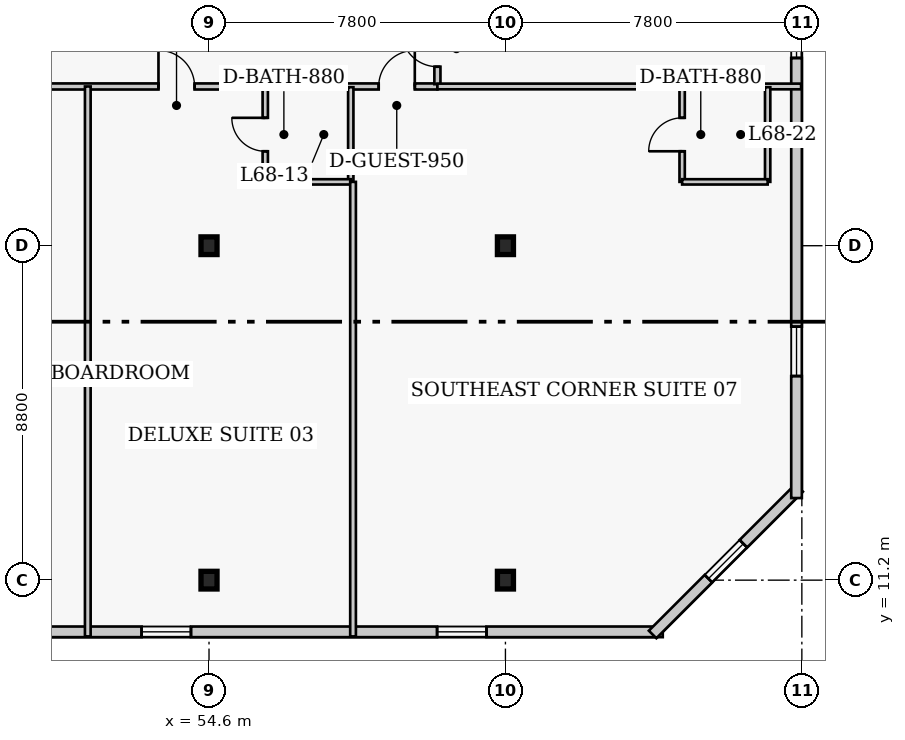
"""IFC4 building model, lengths in metres.
Left out: names, types, materials, properties, quantities, classifications, styles, units other than length and angle.
Written with IfcOpenShell. Run it as: python <this file> out.ifc"""

import sys

from ifc_helpers import new_model, si_unit, direction, frame, frame_2d, origin, origin_2d, place, context, subcontext, project, spatial, rectangle, i_section, extrude, element, fill, save


model = new_model("IFC4")
c1 = context("Model", 3, precision=1e-05, world=origin(), true_north=direction((0.0, 1.0)))
c2 = subcontext(c1, "Body", "Model", "MODEL_VIEW")
j1 = project(units=[si_unit("LENGTHUNIT", "METRE"), si_unit("PLANEANGLEUNIT", "RADIAN")], contexts=[c1])
p1 = place(None, origin())
s1 = spatial("IfcSite", under=j1, at=p1, CompositionType="ELEMENT")
p2 = place(p1, origin())
s2 = spatial("IfcBuilding", under=s1, at=p2, CompositionType="ELEMENT")
p3 = place(p2, frame((0.0, 0.0, 273.4)))
s3 = spatial("IfcBuildingStorey", under=s2, at=p3, CompositionType="ELEMENT", Elevation=273.4)
for number, where, z_axis, x_axis in (
    (1, (54.6, 11.2, 0.0), (0.0, 0.0, 1.0), (1.0, 0.0, 0.0)),
    (2, (54.6, 20.0, 0.0), (0.0, 0.0, 1.0), (1.0, 0.0, 0.0)),
    (3, (62.4, 11.2, 0.0), (0.0, 0.0, 1.0), (1.0, 0.0, 0.0)),
    (4, (62.4, 20.0, 0.0), (0.0, 0.0, 1.0), (1.0, 0.0, 0.0)),
):
    element("IfcColumn", number, at=place(p3, frame(where, z_axis=z_axis, x_axis=x_axis)), inside=s3, PredefinedType="COLUMN", context=c2, shape_type="SweptSolid", body=[
        extrude(i_section(OverallWidth=0.422, OverallDepth=0.465, WebThickness=0.045, FlangeThickness=0.073, FilletRadius=0.017, at=origin_2d()), origin(), (0.0, 0.0, 1.0), 4.0),
    ])
p4 = place(p3, frame((41.71, 9.84, 0.0), z_axis=(0.0, 0.0, 1.0), x_axis=(1.0, 0.0, 0.0)))
e5 = element("IfcWall", 5, at=p4, inside=s3, PredefinedType="SOLIDWALL", context=c2, shape_type="SweptSolid", body=[
    extrude(rectangle(XDim=24.83, YDim=0.28, at=frame_2d((12.415, 0.0))), origin(), (0.0, 0.0, 1.0), 3.76),
])
p5 = place(p4, frame((3.488, 0.0, 0.85)))
e6 = element("IfcOpeningElement", 6, at=p5, cuts=e5, PredefinedType="OPENING", context=c2, shape_type="SweptSolid", body=[
    extrude(rectangle(XDim=1.3, YDim=1.7, at=frame_2d((0.65, 0.85))), frame((0.0, 0.15, 0.0), z_axis=(0.0, -1.0, 0.0), x_axis=(1.0, 0.0, 0.0)), (0.0, 0.0, 1.0), 0.3),
])
p6 = place(p4, frame((11.115, 0.0, 0.85)))
e7 = element("IfcOpeningElement", 7, at=p6, cuts=e5, PredefinedType="OPENING", context=c2, shape_type="SweptSolid", body=[
    extrude(rectangle(XDim=1.3, YDim=1.7, at=frame_2d((0.65, 0.85))), frame((0.0, 0.15, 0.0), z_axis=(0.0, -1.0, 0.0), x_axis=(1.0, 0.0, 0.0)), (0.0, 0.0, 1.0), 0.3),
])
p7 = place(p4, frame((18.892, 0.0, 0.85)))
e8 = element("IfcOpeningElement", 8, at=p7, cuts=e5, PredefinedType="OPENING", context=c2, shape_type="SweptSolid", body=[
    extrude(rectangle(XDim=1.3, YDim=1.7, at=frame_2d((0.65, 0.85))), frame((0.0, 0.15, 0.0), z_axis=(0.0, -1.0, 0.0), x_axis=(1.0, 0.0, 0.0)), (0.0, 0.0, 1.0), 0.3),
])
p8 = place(p3, frame((66.273, 9.771, 0.0), z_axis=(0.0, 0.0, 1.0), x_axis=(0.707129162587, 0.707084399077, 0.0)))
e9 = element("IfcWall", 9, at=p8, inside=s3, PredefinedType="SOLIDWALL", context=c2, shape_type="SweptSolid", body=[
    extrude(rectangle(XDim=5.454, YDim=0.28, at=frame_2d((2.727, 0.0))), origin(), (0.0, 0.0, 1.0), 3.76),
])
p9 = place(p8, frame((2.077, 0.0, 0.85)))
e10 = element("IfcOpeningElement", 10, at=p9, cuts=e9, PredefinedType="OPENING", context=c2, shape_type="SweptSolid", body=[
    extrude(rectangle(XDim=1.3, YDim=1.7, at=frame_2d((0.65, 0.85))), frame((0.0, 0.15, 0.0), z_axis=(0.0, -1.0, 0.0), x_axis=(1.0, 0.0, 0.0)), (0.0, 0.0, 1.0), 0.3),
])
p10 = place(p3, frame((70.06, 13.36, 0.0), z_axis=(0.0, 0.0, 1.0), x_axis=(0.0, 1.0, 0.0)))
e11 = element("IfcWall", 11, at=p10, inside=s3, PredefinedType="SOLIDWALL", context=c2, shape_type="SweptSolid", body=[
    extrude(rectangle(XDim=30.88, YDim=0.28, at=frame_2d((15.44, 0.0))), origin(), (0.0, 0.0, 1.0), 3.76),
])
p11 = place(p10, frame((3.21, 0.0, 0.85)))
e12 = element("IfcOpeningElement", 12, at=p11, cuts=e11, PredefinedType="OPENING", context=c2, shape_type="SweptSolid", body=[
    extrude(rectangle(XDim=1.3, YDim=1.7, at=frame_2d((0.65, 0.85))), frame((0.0, 0.15, 0.0), z_axis=(0.0, -1.0, 0.0), x_axis=(1.0, 0.0, 0.0)), (0.0, 0.0, 1.0), 0.3),
])
p12 = place(p10, frame((11.58, 0.0, 0.85)))
e13 = element("IfcOpeningElement", 13, at=p12, cuts=e11, PredefinedType="OPENING", context=c2, shape_type="SweptSolid", body=[
    extrude(rectangle(XDim=1.3, YDim=1.7, at=frame_2d((0.65, 0.85))), frame((0.0, 0.15, 0.0), z_axis=(0.0, -1.0, 0.0), x_axis=(1.0, 0.0, 0.0)), (0.0, 0.0, 1.0), 0.3),
])
p13 = place(p10, frame((18.65, 0.0, 0.85)))
e14 = element("IfcOpeningElement", 14, at=p13, cuts=e11, PredefinedType="OPENING", context=c2, shape_type="SweptSolid", body=[
    extrude(rectangle(XDim=1.3, YDim=1.7, at=frame_2d((0.65, 0.85))), frame((0.0, 0.15, 0.0), z_axis=(0.0, -1.0, 0.0), x_axis=(1.0, 0.0, 0.0)), (0.0, 0.0, 1.0), 0.3),
])
p14 = place(p10, frame((26.37, 0.0, 0.85)))
e15 = element("IfcOpeningElement", 15, at=p14, cuts=e11, PredefinedType="OPENING", context=c2, shape_type="SweptSolid", body=[
    extrude(rectangle(XDim=1.3, YDim=1.7, at=frame_2d((0.65, 0.85))), frame((0.0, 0.15, 0.0), z_axis=(0.0, -1.0, 0.0), x_axis=(1.0, 0.0, 0.0)), (0.0, 0.0, 1.0), 0.3),
])
p15 = place(p3, frame((35.8, 24.19, 0.0), z_axis=(0.0, 0.0, 1.0), x_axis=(1.0, 0.0, 0.0)))
e16 = element("IfcWall", 16, at=p15, inside=s3, PredefinedType="PARTITIONING", context=c2, shape_type="SweptSolid", body=[
    extrude(rectangle(XDim=24.81, YDim=0.16, at=frame_2d((12.405, 0.0))), origin(), (0.0, 0.0, 1.0), 3.76),
])
p16 = place(p15, frame((2.115, 0.0, 0.0)))
e17 = element("IfcOpeningElement", 17, at=p16, cuts=e16, PredefinedType="OPENING", context=c2, shape_type="SweptSolid", body=[
    extrude(rectangle(XDim=0.95, YDim=2.1, at=frame_2d((0.475, 1.05))), frame((0.0, 0.09, 0.0), z_axis=(0.0, -1.0, 0.0), x_axis=(1.0, 0.0, 0.0)), (0.0, 0.0, 1.0), 0.18),
])
p17 = place(p15, frame((11.345, 0.0, 0.0)))
e18 = element("IfcOpeningElement", 18, at=p17, cuts=e16, PredefinedType="OPENING", context=c2, shape_type="SweptSolid", body=[
    extrude(rectangle(XDim=1.0, YDim=2.15, at=frame_2d((0.5, 1.075))), frame((0.0, 0.09, 0.0), z_axis=(0.0, -1.0, 0.0), x_axis=(1.0, 0.0, 0.0)), (0.0, 0.0, 1.0), 0.18),
])
p18 = place(p15, frame((17.47, 0.0, 0.0)))
e19 = element("IfcOpeningElement", 19, at=p18, cuts=e16, PredefinedType="OPENING", context=c2, shape_type="SweptSolid", body=[
    extrude(rectangle(XDim=0.95, YDim=2.1, at=frame_2d((0.475, 1.05))), frame((0.0, 0.09, 0.0), z_axis=(0.0, -1.0, 0.0), x_axis=(1.0, 0.0, 0.0)), (0.0, 0.0, 1.0), 0.18),
])
p19 = place(p15, frame((23.265, 0.0, 0.0)))
e20 = element("IfcOpeningElement", 20, at=p19, cuts=e16, PredefinedType="OPENING", context=c2, shape_type="SweptSolid", body=[
    extrude(rectangle(XDim=0.95, YDim=2.1, at=frame_2d((0.475, 1.05))), frame((0.0, 0.09, 0.0), z_axis=(0.0, -1.0, 0.0), x_axis=(1.0, 0.0, 0.0)), (0.0, 0.0, 1.0), 0.18),
])
p20 = place(p3, frame((60.61, 24.25, 0.0), z_axis=(0.0, 0.0, 1.0), x_axis=(0.0, 1.0, 0.0)))
e21 = element("IfcWall", 21, at=p20, inside=s3, PredefinedType="PARTITIONING", context=c2, shape_type="SweptSolid", body=[
    extrude(rectangle(XDim=16.4, YDim=0.16, at=frame_2d((8.2, 0.0))), origin(), (0.0, 0.0, 1.0), 3.76),
])
p21 = place(p20, frame((0.46, 0.0, 0.0)))
e22 = element("IfcOpeningElement", 22, at=p21, cuts=e21, PredefinedType="OPENING", context=c2, shape_type="SweptSolid", body=[
    extrude(rectangle(XDim=0.95, YDim=2.1, at=frame_2d((0.475, 1.05))), frame((0.0, 0.09, 0.0), z_axis=(0.0, -1.0, 0.0), x_axis=(1.0, 0.0, 0.0)), (0.0, 0.0, 1.0), 0.18),
])
p22 = place(p20, frame((11.9, 0.0, 0.0)))
e23 = element("IfcOpeningElement", 23, at=p22, cuts=e21, PredefinedType="OPENING", context=c2, shape_type="SweptSolid", body=[
    extrude(rectangle(XDim=1.0, YDim=2.15, at=frame_2d((0.5, 1.075))), frame((0.0, 0.09, 0.0), z_axis=(0.0, -1.0, 0.0), x_axis=(1.0, 0.0, 0.0)), (0.0, 0.0, 1.0), 0.18),
])
p23 = place(p3, frame((51.41, 9.72, 0.0), z_axis=(0.0, 0.0, 1.0), x_axis=(0.0, 1.0, 0.0)))
e24 = element("IfcWall", 24, at=p23, inside=s3, PredefinedType="PARTITIONING", context=c2, shape_type="SweptSolid", body=[
    extrude(rectangle(XDim=14.47, YDim=0.15, at=frame_2d((7.235, 0.0))), origin(), (0.0, 0.0, 1.0), 3.76),
])
p24 = place(p3, frame((56.08, 21.68, 0.0), z_axis=(0.0, 0.0, 1.0), x_axis=(0.0, 1.0, 0.0)))
e25 = element("IfcWall", 25, at=p24, inside=s3, PredefinedType="PLUMBINGWALL", context=c2, shape_type="SweptSolid", body=[
    extrude(rectangle(XDim=2.49, YDim=0.14, at=frame_2d((1.245, 0.0))), origin(), (0.0, 0.0, 1.0), 3.76),
])
p25 = place(p24, frame((0.805, 0.0, 0.0)))
e26 = element("IfcOpeningElement", 26, at=p25, cuts=e25, PredefinedType="OPENING", context=c2, shape_type="SweptSolid", body=[
    extrude(rectangle(XDim=0.88, YDim=2.05, at=frame_2d((0.44, 1.025))), frame((0.0, 0.08, 0.0), z_axis=(0.0, -1.0, 0.0), x_axis=(1.0, 0.0, 0.0)), (0.0, 0.0, 1.0), 0.16),
])
p26 = place(p3, frame((58.33, 21.68, 0.0), z_axis=(0.0, 0.0, 1.0), x_axis=(0.0, 1.0, 0.0)))
e27 = element("IfcWall", 27, at=p26, inside=s3, PredefinedType="PLUMBINGWALL", context=c2, shape_type="SweptSolid", body=[
    extrude(rectangle(XDim=2.49, YDim=0.14, at=frame_2d((1.245, 0.0))), origin(), (0.0, 0.0, 1.0), 3.76),
])
p27 = place(p3, frame((56.08, 21.68, 0.0), z_axis=(0.0, 0.0, 1.0), x_axis=(1.0, 0.0, 0.0)))
e28 = element("IfcWall", 28, at=p27, inside=s3, PredefinedType="PLUMBINGWALL", context=c2, shape_type="SweptSolid", body=[
    extrude(rectangle(XDim=2.25, YDim=0.14, at=frame_2d((1.125, 0.0))), origin(), (0.0, 0.0, 1.0), 3.76),
])
p28 = place(p3, frame((58.39, 9.72, 0.0), z_axis=(0.0, 0.0, 1.0), x_axis=(0.0, 1.0, 0.0)))
e29 = element("IfcWall", 29, at=p28, inside=s3, PredefinedType="PARTITIONING", context=c2, shape_type="SweptSolid", body=[
    extrude(rectangle(XDim=11.96, YDim=0.15, at=frame_2d((5.98, 0.0))), origin(), (0.0, 0.0, 1.0), 3.356),
])
p29 = place(p3, frame((60.61, 24.19, 0.0), z_axis=(0.0, 0.0, 1.0), x_axis=(1.0, 0.0, 0.0)))
e30 = element("IfcWall", 30, at=p29, inside=s3, PredefinedType="PARTITIONING", context=c2, shape_type="SweptSolid", body=[
    extrude(rectangle(XDim=9.57, YDim=0.15, at=frame_2d((4.785, 0.0))), origin(), (0.0, 0.0, 1.0), 3.76),
])
p30 = place(p3, frame((67.05, 21.68, 0.0), z_axis=(0.0, 0.0, 1.0), x_axis=(0.0, 1.0, 0.0)))
e31 = element("IfcWall", 31, at=p30, inside=s3, PredefinedType="PLUMBINGWALL", context=c2, shape_type="SweptSolid", body=[
    extrude(rectangle(XDim=2.49, YDim=0.14, at=frame_2d((1.245, 0.0))), origin(), (0.0, 0.0, 1.0), 3.76),
])
p31 = place(p30, frame((0.805, 0.0, 0.0)))
e32 = element("IfcOpeningElement", 32, at=p31, cuts=e31, PredefinedType="OPENING", context=c2, shape_type="SweptSolid", body=[
    extrude(rectangle(XDim=0.88, YDim=2.05, at=frame_2d((0.44, 1.025))), frame((0.0, 0.08, 0.0), z_axis=(0.0, -1.0, 0.0), x_axis=(1.0, 0.0, 0.0)), (0.0, 0.0, 1.0), 0.16),
])
p32 = place(p3, frame((69.3, 21.68, 0.0), z_axis=(0.0, 0.0, 1.0), x_axis=(0.0, 1.0, 0.0)))
e33 = element("IfcWall", 33, at=p32, inside=s3, PredefinedType="PLUMBINGWALL", context=c2, shape_type="SweptSolid", body=[
    extrude(rectangle(XDim=2.49, YDim=0.14, at=frame_2d((1.245, 0.0))), origin(), (0.0, 0.0, 1.0), 3.76),
])
p33 = place(p3, frame((67.05, 21.68, 0.0), z_axis=(0.0, 0.0, 1.0), x_axis=(1.0, 0.0, 0.0)))
e34 = element("IfcWall", 34, at=p33, inside=s3, PredefinedType="PLUMBINGWALL", context=c2, shape_type="SweptSolid", body=[
    extrude(rectangle(XDim=2.25, YDim=0.14, at=frame_2d((1.125, 0.0))), origin(), (0.0, 0.0, 1.0), 3.76),
])
p34 = place(p6, origin())
e35 = element("IfcWindow", 35, at=p34, inside=s3, PartitioningType="SINGLE_PANEL", PredefinedType="WINDOW", context=c2, shape_type="SweptSolid", body=[
    extrude(rectangle(XDim=1.3, YDim=1.7, at=frame_2d((0.65, 0.85))), frame((0.0, 0.03, 0.0), z_axis=(0.0, -1.0, 0.0), x_axis=(1.0, 0.0, 0.0)), (0.0, 0.0, 1.0), 0.06),
])
fill(e7, e35)
p35 = place(p7, origin())
e36 = element("IfcWindow", 36, at=p35, inside=s3, PartitioningType="SINGLE_PANEL", PredefinedType="WINDOW", context=c2, shape_type="SweptSolid", body=[
    extrude(rectangle(XDim=1.3, YDim=1.7, at=frame_2d((0.65, 0.85))), frame((0.0, 0.03, 0.0), z_axis=(0.0, -1.0, 0.0), x_axis=(1.0, 0.0, 0.0)), (0.0, 0.0, 1.0), 0.06),
])
fill(e8, e36)
p36 = place(p9, origin())
e37 = element("IfcWindow", 37, at=p36, inside=s3, PartitioningType="SINGLE_PANEL", PredefinedType="WINDOW", context=c2, shape_type="SweptSolid", body=[
    extrude(rectangle(XDim=1.3, YDim=1.7, at=frame_2d((0.65, 0.85))), frame((0.0, 0.03, 0.0), z_axis=(0.0, -1.0, 0.0), x_axis=(1.0, 0.0, 0.0)), (0.0, 0.0, 1.0), 0.06),
])
fill(e10, e37)
p37 = place(p11, origin())
e38 = element("IfcWindow", 38, at=p37, inside=s3, PartitioningType="SINGLE_PANEL", PredefinedType="WINDOW", context=c2, shape_type="SweptSolid", body=[
    extrude(rectangle(XDim=1.3, YDim=1.7, at=frame_2d((0.65, 0.85))), frame((0.0, 0.03, 0.0), z_axis=(0.0, -1.0, 0.0), x_axis=(1.0, 0.0, 0.0)), (0.0, 0.0, 1.0), 0.06),
])
fill(e12, e38)
p38 = place(p12, origin())
e39 = element("IfcWindow", 39, at=p38, inside=s3, PartitioningType="SINGLE_PANEL", PredefinedType="WINDOW", context=c2, shape_type="SweptSolid", body=[
    extrude(rectangle(XDim=1.3, YDim=1.7, at=frame_2d((0.65, 0.85))), frame((0.0, 0.03, 0.0), z_axis=(0.0, -1.0, 0.0), x_axis=(1.0, 0.0, 0.0)), (0.0, 0.0, 1.0), 0.06),
])
fill(e13, e39)
p39 = place(p25, origin())
e40 = element("IfcDoor", 40, at=p39, inside=s3, OperationType="SINGLE_SWING_RIGHT", PredefinedType="DOOR", context=c2, shape_type="SweptSolid", body=[
    extrude(rectangle(XDim=0.88, YDim=2.05, at=frame_2d((0.44, 1.025))), frame((0.0, 0.025, 0.0), z_axis=(0.0, -1.0, 0.0), x_axis=(1.0, 0.0, 0.0)), (0.0, 0.0, 1.0), 0.05),
])
fill(e26, e40)
p40 = place(p18, origin())
e41 = element("IfcDoor", 41, at=p40, inside=s3, OperationType="SINGLE_SWING_LEFT", PredefinedType="DOOR", context=c2, shape_type="SweptSolid", body=[
    extrude(rectangle(XDim=0.95, YDim=2.1, at=frame_2d((0.475, 1.05))), frame((0.0, 0.025, 0.0), z_axis=(0.0, -1.0, 0.0), x_axis=(1.0, 0.0, 0.0)), (0.0, 0.0, 1.0), 0.05),
])
fill(e19, e41)
p41 = place(p31, origin())
e42 = element("IfcDoor", 42, at=p41, inside=s3, OperationType="SINGLE_SWING_LEFT", PredefinedType="DOOR", context=c2, shape_type="SweptSolid", body=[
    extrude(rectangle(XDim=0.88, YDim=2.05, at=frame_2d((0.44, 1.025))), frame((0.0, 0.025, 0.0), z_axis=(0.0, -1.0, 0.0), x_axis=(1.0, 0.0, 0.0)), (0.0, 0.0, 1.0), 0.05),
])
fill(e32, e42)
p42 = place(p19, origin())
e43 = element("IfcDoor", 43, at=p42, inside=s3, OperationType="SINGLE_SWING_RIGHT", PredefinedType="DOOR", context=c2, shape_type="SweptSolid", body=[
    extrude(rectangle(XDim=0.95, YDim=2.1, at=frame_2d((0.475, 1.05))), frame((0.0, 0.025, 0.0), z_axis=(0.0, -1.0, 0.0), x_axis=(1.0, 0.0, 0.0)), (0.0, 0.0, 1.0), 0.05),
])
fill(e20, e43)
p43 = place(p21, origin())
e44 = element("IfcDoor", 44, at=p43, inside=s3, OperationType="SINGLE_SWING_RIGHT", PredefinedType="DOOR", context=c2, shape_type="SweptSolid", body=[
    extrude(rectangle(XDim=0.95, YDim=2.1, at=frame_2d((0.475, 1.05))), frame((0.0, 0.025, 0.0), z_axis=(0.0, -1.0, 0.0), x_axis=(1.0, 0.0, 0.0)), (0.0, 0.0, 1.0), 0.05),
])
fill(e22, e44)
save(model, sys.argv[1])
